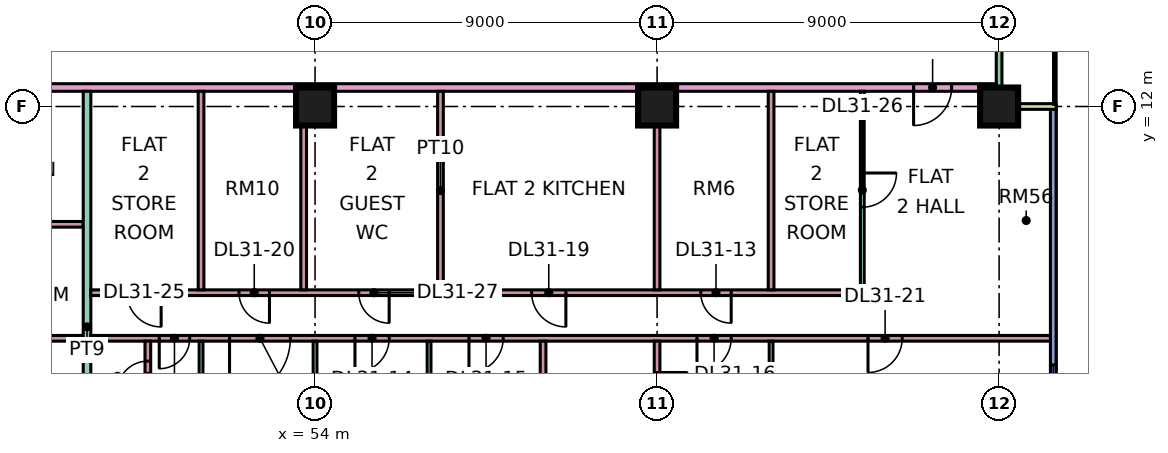
"""IFC4 building model, lengths in metres.
Left out: names, types, materials, properties, quantities, classifications, styles, units other than length and angle.
Written with IfcOpenShell. Run it as: python <this file> out.ifc"""

import sys

from ifc_helpers import new_model, si_unit, direction, frame, frame_2d, origin, origin_2d, place, context, subcontext, project, spatial, rectangle, extrude, element, fill, save


model = new_model("IFC4")
c1 = context("Model", 3, precision=1e-05, world=origin(), true_north=direction((0.0, 1.0)))
c2 = subcontext(c1, "Body", "Model", "MODEL_VIEW")
j1 = project(units=[si_unit("LENGTHUNIT", "METRE"), si_unit("PLANEANGLEUNIT", "RADIAN")], contexts=[c1])
p1 = place(None, origin())
s1 = spatial("IfcSite", under=j1, at=p1, CompositionType="ELEMENT")
p2 = place(p1, origin())
s2 = spatial("IfcBuilding", under=s1, at=p2, CompositionType="ELEMENT")
p3 = place(p2, frame((0.0, 0.0, 133.15)))
s3 = spatial("IfcBuildingStorey", under=s2, at=p3, CompositionType="ELEMENT", Elevation=133.15)
for number, where, z_axis, x_axis in (
    (1, (54.0, 12.0, 0.0), (0.0, 0.0, 1.0), (1.0, 0.0, 0.0)),
    (2, (63.0, 12.0, 0.0), (0.0, 0.0, 1.0), (1.0, 0.0, 0.0)),
    (3, (72.0, 12.0, 0.0), (0.0, 0.0, 1.0), (1.0, 0.0, 0.0)),
):
    element("IfcColumn", number, at=place(p3, frame(where, z_axis=z_axis, x_axis=x_axis)), inside=s3, PredefinedType="COLUMN", context=c2, shape_type="SweptSolid", body=[
        extrude(rectangle(XDim=1.0, YDim=1.0, at=origin_2d()), origin(), (0.0, 0.0, 1.0), 3.75),
    ])
p4 = place(p3, frame((73.425, 1.5, 0.0), z_axis=(0.0, 0.0, 1.0), x_axis=(0.0, 1.0, 0.0)))
e4 = element("IfcWall", 4, at=p4, inside=s3, PredefinedType="SOLIDWALL", context=c2, shape_type="SweptSolid", body=[
    extrude(rectangle(XDim=10.425, YDim=0.15, at=frame_2d((5.212, 0.0))), origin(), (0.0, 0.0, 1.0), 3.35),
])
p5 = place(p4, frame((0.7, 0.0, 0.45)))
e5 = element("IfcOpeningElement", 5, at=p5, cuts=e4, PredefinedType="OPENING", context=c2, shape_type="SweptSolid", body=[
    extrude(rectangle(XDim=3.0, YDim=2.4, at=frame_2d((1.5, 1.2))), frame((0.0, 0.085, 0.0), z_axis=(0.0, -1.0, 0.0), x_axis=(1.0, 0.0, 0.0)), (0.0, 0.0, 1.0), 0.17),
])
p6 = place(p3, frame((72.0, 12.075, 0.0), z_axis=(0.0, 0.0, 1.0), x_axis=(0.0, 1.0, 0.0)))
e6 = element("IfcWall", 6, at=p6, inside=s3, PredefinedType="SOLIDWALL", context=c2, shape_type="SweptSolid", body=[
    extrude(rectangle(XDim=10.35, YDim=0.15, at=frame_2d((5.175, 0.0))), origin(), (0.0, 0.0, 1.0), 3.35),
])
p7 = place(p6, frame((4.275, 0.0, 1.7)))
e7 = element("IfcOpeningElement", 7, at=p7, cuts=e6, PredefinedType="OPENING", context=c2, shape_type="SweptSolid", body=[
    extrude(rectangle(XDim=1.2, YDim=0.9, at=frame_2d((0.6, 0.45))), frame((0.0, 0.085, 0.0), z_axis=(0.0, -1.0, 0.0), x_axis=(1.0, 0.0, 0.0)), (0.0, 0.0, 1.0), 0.17),
])
p8 = place(p6, frame((7.988, 0.0, 0.45)))
e8 = element("IfcOpeningElement", 8, at=p8, cuts=e6, PredefinedType="OPENING", context=c2, shape_type="SweptSolid", body=[
    extrude(rectangle(XDim=1.8, YDim=2.4, at=frame_2d((0.9, 1.2))), frame((0.0, 0.085, 0.0), z_axis=(0.0, -1.0, 0.0), x_axis=(1.0, 0.0, 0.0)), (0.0, 0.0, 1.0), 0.17),
])
p9 = place(p3, frame((73.5, 12.0, 0.0), z_axis=(0.0, 0.0, 1.0), x_axis=(-1.0, 0.0, 0.0)))
e9 = element("IfcWall", 9, at=p9, inside=s3, PredefinedType="SOLIDWALL", context=c2, shape_type="SweptSolid", body=[
    extrude(rectangle(XDim=1.5, YDim=0.15, at=frame_2d((0.75, 0.0))), origin(), (0.0, 0.0, 1.0), 3.35),
])
p10 = place(p3, frame((40.65, 12.5, 0.0), z_axis=(0.0, 0.0, 1.0), x_axis=(1.0, 0.0, 0.0)))
e10 = element("IfcWall", 10, at=p10, inside=s3, PredefinedType="PARTITIONING", context=c2, shape_type="SweptSolid", body=[
    extrude(rectangle(XDim=31.276, YDim=0.2, at=frame_2d((15.638, 0.0))), origin(), (0.0, 0.0, 1.0), 3.35),
])
p11 = place(p10, frame((29.1, 0.0, 0.0)))
e11 = element("IfcOpeningElement", 11, at=p11, cuts=e10, PredefinedType="OPENING", context=c2, shape_type="SweptSolid", body=[
    extrude(rectangle(XDim=1.0, YDim=2.1, at=frame_2d((0.5, 1.05))), frame((0.0, 0.11, 0.0), z_axis=(0.0, -1.0, 0.0), x_axis=(1.0, 0.0, 0.0)), (0.0, 0.0, 1.0), 0.22),
])
p12 = place(p10, frame((1.05, 0.0, 0.0)))
e12 = element("IfcOpeningElement", 12, at=p12, cuts=e10, PredefinedType="OPENING", context=c2, shape_type="SweptSolid", body=[
    extrude(rectangle(XDim=1.0, YDim=2.1, at=frame_2d((0.5, 1.05))), frame((0.0, 0.11, 0.0), z_axis=(0.0, -1.0, 0.0), x_axis=(1.0, 0.0, 0.0)), (0.0, 0.0, 1.0), 0.22),
])
p13 = place(p3, frame((43.725, 5.9, 0.0), z_axis=(0.0, 0.0, 1.0), x_axis=(1.0, 0.0, 0.0)))
e13 = element("IfcWall", 13, at=p13, inside=s3, PredefinedType="PARTITIONING", context=c2, shape_type="SweptSolid", body=[
    extrude(rectangle(XDim=4.175, YDim=0.15, at=frame_2d((2.087, 0.0))), origin(), (0.0, 0.0, 1.0), 3.35),
])
p14 = place(p13, frame((1.675, 0.0, 0.0)))
e14 = element("IfcOpeningElement", 14, at=p14, cuts=e13, PredefinedType="OPENING", context=c2, shape_type="SweptSolid", body=[
    extrude(rectangle(XDim=0.8, YDim=2.1, at=frame_2d((0.4, 1.05))), frame((0.0, 0.085, 0.0), z_axis=(0.0, -1.0, 0.0), x_axis=(1.0, 0.0, 0.0)), (0.0, 0.0, 1.0), 0.17),
])
p15 = place(p3, frame((43.725, 8.9, 0.0), z_axis=(0.0, 0.0, 1.0), x_axis=(1.0, 0.0, 0.0)))
e15 = element("IfcWall", 15, at=p15, inside=s3, PredefinedType="PARTITIONING", context=c2, shape_type="SweptSolid", body=[
    extrude(rectangle(XDim=4.175, YDim=0.15, at=frame_2d((2.087, 0.0))), origin(), (0.0, 0.0, 1.0), 3.35),
])
p16 = place(p3, frame((48.0, 0.0, 0.0), z_axis=(0.0, 0.0, 1.0), x_axis=(0.0, 1.0, 0.0)))
e16 = element("IfcWall", 16, at=p16, inside=s3, PredefinedType="PARTITIONING", context=c2, shape_type="SweptSolid", body=[
    extrude(rectangle(XDim=12.4, YDim=0.2, at=frame_2d((6.2, 0.0))), origin(), (0.0, 0.0, 1.0), 3.35),
])
p17 = place(p3, frame((48.1, 5.9, 0.0), z_axis=(0.0, 0.0, 1.0), x_axis=(1.0, 0.0, 0.0)))
e17 = element("IfcWall", 17, at=p17, inside=s3, PredefinedType="PARTITIONING", context=c2, shape_type="SweptSolid", body=[
    extrude(rectangle(XDim=25.25, YDim=0.15, at=frame_2d((12.625, 0.0))), origin(), (0.0, 0.0, 1.0), 3.35),
])
p18 = place(p17, frame((6.95, 0.0, 0.0)))
e18 = element("IfcOpeningElement", 18, at=p18, cuts=e17, PredefinedType="OPENING", context=c2, shape_type="SweptSolid", body=[
    extrude(rectangle(XDim=0.9, YDim=2.1, at=frame_2d((0.45, 1.05))), frame((0.0, 0.085, 0.0), z_axis=(0.0, -1.0, 0.0), x_axis=(1.0, 0.0, 0.0)), (0.0, 0.0, 1.0), 0.17),
])
p19 = place(p17, frame((9.95, 0.0, 0.0)))
e19 = element("IfcOpeningElement", 19, at=p19, cuts=e17, PredefinedType="OPENING", context=c2, shape_type="SweptSolid", body=[
    extrude(rectangle(XDim=0.9, YDim=2.1, at=frame_2d((0.45, 1.05))), frame((0.0, 0.085, 0.0), z_axis=(0.0, -1.0, 0.0), x_axis=(1.0, 0.0, 0.0)), (0.0, 0.0, 1.0), 0.17),
])
p20 = place(p17, frame((15.95, 0.0, 0.0)))
e20 = element("IfcOpeningElement", 20, at=p20, cuts=e17, PredefinedType="OPENING", context=c2, shape_type="SweptSolid", body=[
    extrude(rectangle(XDim=0.9, YDim=2.1, at=frame_2d((0.45, 1.05))), frame((0.0, 0.085, 0.0), z_axis=(0.0, -1.0, 0.0), x_axis=(1.0, 0.0, 0.0)), (0.0, 0.0, 1.0), 0.17),
])
p21 = place(p17, frame((20.45, 0.0, 0.0)))
e21 = element("IfcOpeningElement", 21, at=p21, cuts=e17, PredefinedType="OPENING", context=c2, shape_type="SweptSolid", body=[
    extrude(rectangle(XDim=0.9, YDim=2.1, at=frame_2d((0.45, 1.05))), frame((0.0, 0.085, 0.0), z_axis=(0.0, -1.0, 0.0), x_axis=(1.0, 0.0, 0.0)), (0.0, 0.0, 1.0), 0.17),
])
p22 = place(p17, frame((1.8, 0.0, 0.0)))
e22 = element("IfcOpeningElement", 22, at=p22, cuts=e17, PredefinedType="OPENING", context=c2, shape_type="SweptSolid", body=[
    extrude(rectangle(XDim=0.8, YDim=2.1, at=frame_2d((0.4, 1.05))), frame((0.0, 0.085, 0.0), z_axis=(0.0, -1.0, 0.0), x_axis=(1.0, 0.0, 0.0)), (0.0, 0.0, 1.0), 0.17),
])
p23 = place(p17, frame((3.65, 0.0, 0.0)))
e23 = element("IfcOpeningElement", 23, at=p23, cuts=e17, PredefinedType="OPENING", context=c2, shape_type="SweptSolid", body=[
    extrude(rectangle(XDim=1.6, YDim=2.1, at=frame_2d((0.8, 1.05))), frame((0.0, 0.085, 0.0), z_axis=(0.0, -1.0, 0.0), x_axis=(1.0, 0.0, 0.0)), (0.0, 0.0, 1.0), 0.17),
])
p24 = place(p3, frame((48.1, 7.1, 0.0), z_axis=(0.0, 0.0, 1.0), x_axis=(1.0, 0.0, 0.0)))
e24 = element("IfcWall", 24, at=p24, inside=s3, PredefinedType="PARTITIONING", context=c2, shape_type="SweptSolid", body=[
    extrude(rectangle(XDim=20.35, YDim=0.15, at=frame_2d((10.175, 0.0))), origin(), (0.0, 0.0, 1.0), 3.35),
])
p25 = place(p24, frame((16.05, 0.0, 0.0)))
e25 = element("IfcOpeningElement", 25, at=p25, cuts=e24, PredefinedType="OPENING", context=c2, shape_type="SweptSolid", body=[
    extrude(rectangle(XDim=0.8, YDim=2.1, at=frame_2d((0.4, 1.05))), frame((0.0, 0.085, 0.0), z_axis=(0.0, -1.0, 0.0), x_axis=(1.0, 0.0, 0.0)), (0.0, 0.0, 1.0), 0.17),
])
p26 = place(p24, frame((11.6, 0.0, 0.0)))
e26 = element("IfcOpeningElement", 26, at=p26, cuts=e24, PredefinedType="OPENING", context=c2, shape_type="SweptSolid", body=[
    extrude(rectangle(XDim=0.9, YDim=2.1, at=frame_2d((0.45, 1.05))), frame((0.0, 0.085, 0.0), z_axis=(0.0, -1.0, 0.0), x_axis=(1.0, 0.0, 0.0)), (0.0, 0.0, 1.0), 0.17),
])
p27 = place(p24, frame((3.9, 0.0, 0.0)))
e27 = element("IfcOpeningElement", 27, at=p27, cuts=e24, PredefinedType="OPENING", context=c2, shape_type="SweptSolid", body=[
    extrude(rectangle(XDim=0.8, YDim=2.1, at=frame_2d((0.4, 1.05))), frame((0.0, 0.085, 0.0), z_axis=(0.0, -1.0, 0.0), x_axis=(1.0, 0.0, 0.0)), (0.0, 0.0, 1.0), 0.17),
])
p28 = place(p24, frame((0.95, 0.0, 0.0)))
e28 = element("IfcOpeningElement", 28, at=p28, cuts=e24, PredefinedType="OPENING", context=c2, shape_type="SweptSolid", body=[
    extrude(rectangle(XDim=0.9, YDim=2.1, at=frame_2d((0.45, 1.05))), frame((0.0, 0.085, 0.0), z_axis=(0.0, -1.0, 0.0), x_axis=(1.0, 0.0, 0.0)), (0.0, 0.0, 1.0), 0.17),
])
p29 = place(p24, frame((7.05, 0.0, 0.0)))
e29 = element("IfcOpeningElement", 29, at=p29, cuts=e24, PredefinedType="OPENING", context=c2, shape_type="SweptSolid", body=[
    extrude(rectangle(XDim=0.8, YDim=2.1, at=frame_2d((0.4, 1.05))), frame((0.0, 0.085, 0.0), z_axis=(0.0, -1.0, 0.0), x_axis=(1.0, 0.0, 0.0)), (0.0, 0.0, 1.0), 0.17),
])
p30 = place(p3, frame((49.6, 3.825, 0.0), z_axis=(0.0, 0.0, 1.0), x_axis=(0.0, 1.0, 0.0)))
e30 = element("IfcWall", 30, at=p30, inside=s3, PredefinedType="PARTITIONING", context=c2, shape_type="SweptSolid", body=[
    extrude(rectangle(XDim=2.0, YDim=0.15, at=frame_2d((1.0, 0.0))), origin(), (0.0, 0.0, 1.0), 3.35),
])
p31 = place(p30, frame((0.675, 0.0, 0.0)))
e31 = element("IfcOpeningElement", 31, at=p31, cuts=e30, PredefinedType="OPENING", context=c2, shape_type="SweptSolid", body=[
    extrude(rectangle(XDim=0.8, YDim=2.1, at=frame_2d((0.4, 1.05))), frame((0.0, 0.085, 0.0), z_axis=(0.0, -1.0, 0.0), x_axis=(1.0, 0.0, 0.0)), (0.0, 0.0, 1.0), 0.17),
])
p32 = place(p3, frame((51.0, -1.351, 0.0), z_axis=(0.0, 0.0, 1.0), x_axis=(0.0, 1.0, 0.0)))
e32 = element("IfcWall", 32, at=p32, inside=s3, PredefinedType="PARTITIONING", context=c2, shape_type="SweptSolid", body=[
    extrude(rectangle(XDim=7.176, YDim=0.1, at=frame_2d((3.588, 0.0))), origin(), (0.0, 0.0, 1.0), 3.35),
])
for number, where, z_axis, x_axis in (
    (33, (51.0, 7.175, 0.0), (0.0, 0.0, 1.0), (0.0, 1.0, 0.0)),
    (34, (53.7, 7.175, 0.0), (0.0, 0.0, 1.0), (0.0, 1.0, 0.0)),
):
    element("IfcWall", number, at=place(p3, frame(where, z_axis=z_axis, x_axis=x_axis)), inside=s3, PredefinedType="PARTITIONING", context=c2, shape_type="SweptSolid", body=[
        extrude(rectangle(XDim=5.225, YDim=0.15, at=frame_2d((2.612, 0.0))), origin(), (0.0, 0.0, 1.0), 3.35),
    ])
for number, where, z_axis, x_axis in (
    (35, (54.0, -1.351, 0.0), (0.0, 0.0, 1.0), (0.0, 1.0, 0.0)),
    (36, (57.0, -1.351, 0.0), (0.0, 0.0, 1.0), (0.0, 1.0, 0.0)),
):
    element("IfcWall", number, at=place(p3, frame(where, z_axis=z_axis, x_axis=x_axis)), inside=s3, PredefinedType="PARTITIONING", context=c2, shape_type="SweptSolid", body=[
        extrude(rectangle(XDim=7.176, YDim=0.1, at=frame_2d((3.588, 0.0))), origin(), (0.0, 0.0, 1.0), 3.35),
    ])
p33 = place(p3, frame((57.3, 7.175, 0.0), z_axis=(0.0, 0.0, 1.0), x_axis=(0.0, 1.0, 0.0)))
e37 = element("IfcWall", 37, at=p33, inside=s3, PredefinedType="PARTITIONING", context=c2, shape_type="SweptSolid", body=[
    extrude(rectangle(XDim=5.225, YDim=0.15, at=frame_2d((2.612, 0.0))), origin(), (0.0, 0.0, 1.0), 3.35),
])
p34 = place(p3, frame((60.0, 0.0, 0.0), z_axis=(0.0, 0.0, 1.0), x_axis=(0.0, 1.0, 0.0)))
e38 = element("IfcWall", 38, at=p34, inside=s3, PredefinedType="PARTITIONING", context=c2, shape_type="SweptSolid", body=[
    extrude(rectangle(XDim=5.825, YDim=0.15, at=frame_2d((2.913, 0.0))), origin(), (0.0, 0.0, 1.0), 3.35),
])
p35 = place(p3, frame((63.0, 3.375, 0.0), z_axis=(0.0, 0.0, 1.0), x_axis=(0.0, 1.0, 0.0)))
e39 = element("IfcWall", 39, at=p35, inside=s3, PredefinedType="PARTITIONING", context=c2, shape_type="SweptSolid", body=[
    extrude(rectangle(XDim=2.45, YDim=0.15, at=frame_2d((1.225, 0.0))), origin(), (0.0, 0.0, 1.0), 3.35),
])
p36 = place(p35, frame((0.825, 0.0, 0.0)))
e40 = element("IfcOpeningElement", 40, at=p36, cuts=e39, PredefinedType="OPENING", context=c2, shape_type="SweptSolid", body=[
    extrude(rectangle(XDim=0.8, YDim=2.1, at=frame_2d((0.4, 1.05))), frame((0.0, 0.085, 0.0), z_axis=(0.0, -1.0, 0.0), x_axis=(1.0, 0.0, 0.0)), (0.0, 0.0, 1.0), 0.17),
])
p37 = place(p3, frame((63.0, 7.175, 0.0), z_axis=(0.0, 0.0, 1.0), x_axis=(0.0, 1.0, 0.0)))
e41 = element("IfcWall", 41, at=p37, inside=s3, PredefinedType="PARTITIONING", context=c2, shape_type="SweptSolid", body=[
    extrude(rectangle(XDim=5.225, YDim=0.15, at=frame_2d((2.612, 0.0))), origin(), (0.0, 0.0, 1.0), 3.35),
])
p38 = place(p3, frame((66.0, 0.074, 0.0), z_axis=(0.0, 0.0, 1.0), x_axis=(0.0, 1.0, 0.0)))
e42 = element("IfcWall", 42, at=p38, inside=s3, PredefinedType="PARTITIONING", context=c2, shape_type="SweptSolid", body=[
    extrude(rectangle(XDim=5.751, YDim=0.1, at=frame_2d((2.875, 0.0))), origin(), (0.0, 0.0, 1.0), 3.35),
])
p39 = place(p3, frame((66.0, 7.175, 0.0), z_axis=(0.0, 0.0, 1.0), x_axis=(0.0, 1.0, 0.0)))
e43 = element("IfcWall", 43, at=p39, inside=s3, PredefinedType="PARTITIONING", context=c2, shape_type="SweptSolid", body=[
    extrude(rectangle(XDim=5.225, YDim=0.15, at=frame_2d((2.612, 0.0))), origin(), (0.0, 0.0, 1.0), 3.35),
])
p40 = place(p3, frame((68.4, 7.175, 0.0), z_axis=(0.0, 0.0, 1.0), x_axis=(0.0, 1.0, 0.0)))
e44 = element("IfcWall", 44, at=p40, inside=s3, PredefinedType="PARTITIONING", context=c2, shape_type="SweptSolid", body=[
    extrude(rectangle(XDim=5.225, YDim=0.1, at=frame_2d((2.612, 0.0))), origin(), (0.0, 0.0, 1.0), 3.35),
])
p41 = place(p40, frame((2.175, 0.0, 0.0)))
e45 = element("IfcOpeningElement", 45, at=p41, cuts=e44, PredefinedType="OPENING", context=c2, shape_type="SweptSolid", body=[
    extrude(rectangle(XDim=0.9, YDim=2.1, at=frame_2d((0.45, 1.05))), frame((0.0, 0.06, 0.0), z_axis=(0.0, -1.0, 0.0), x_axis=(1.0, 0.0, 0.0)), (0.0, 0.0, 1.0), 0.12),
])
p42 = place(p5, origin())
e46 = element("IfcWindow", 46, at=p42, inside=s3, PartitioningType="SINGLE_PANEL", PredefinedType="WINDOW", context=c2, shape_type="SweptSolid", body=[
    extrude(rectangle(XDim=3.0, YDim=2.4, at=frame_2d((1.5, 1.2))), frame((0.0, 0.03, 0.0), z_axis=(0.0, -1.0, 0.0), x_axis=(1.0, 0.0, 0.0)), (0.0, 0.0, 1.0), 0.06),
])
fill(e5, e46)
p43 = place(p25, origin())
e47 = element("IfcDoor", 47, at=p43, inside=s3, OperationType="SINGLE_SWING_RIGHT", PredefinedType="DOOR", context=c2, shape_type="SweptSolid", body=[
    extrude(rectangle(XDim=0.8, YDim=2.1, at=frame_2d((0.4, 1.05))), frame((0.0, 0.025, 0.0), z_axis=(0.0, -1.0, 0.0), x_axis=(1.0, 0.0, 0.0)), (0.0, 0.0, 1.0), 0.05),
])
fill(e25, e47)
p44 = place(p18, frame((0.9, 0.0, 0.0), z_axis=(0.0, 0.0, 1.0), x_axis=(-1.0, 0.0, 0.0)))
e48 = element("IfcDoor", 48, at=p44, inside=s3, OperationType="SINGLE_SWING_LEFT", PredefinedType="DOOR", context=c2, shape_type="SweptSolid", body=[
    extrude(rectangle(XDim=0.9, YDim=2.1, at=frame_2d((0.45, 1.05))), frame((0.0, 0.025, 0.0), z_axis=(0.0, -1.0, 0.0), x_axis=(1.0, 0.0, 0.0)), (0.0, 0.0, 1.0), 0.05),
])
fill(e18, e48)
p45 = place(p19, frame((0.9, 0.0, 0.0), z_axis=(0.0, 0.0, 1.0), x_axis=(-1.0, 0.0, 0.0)))
e49 = element("IfcDoor", 49, at=p45, inside=s3, OperationType="SINGLE_SWING_LEFT", PredefinedType="DOOR", context=c2, shape_type="SweptSolid", body=[
    extrude(rectangle(XDim=0.9, YDim=2.1, at=frame_2d((0.45, 1.05))), frame((0.0, 0.025, 0.0), z_axis=(0.0, -1.0, 0.0), x_axis=(1.0, 0.0, 0.0)), (0.0, 0.0, 1.0), 0.05),
])
fill(e19, e49)
p46 = place(p20, frame((0.9, 0.0, 0.0), z_axis=(0.0, 0.0, 1.0), x_axis=(-1.0, 0.0, 0.0)))
e50 = element("IfcDoor", 50, at=p46, inside=s3, OperationType="SINGLE_SWING_LEFT", PredefinedType="DOOR", context=c2, shape_type="SweptSolid", body=[
    extrude(rectangle(XDim=0.9, YDim=2.1, at=frame_2d((0.45, 1.05))), frame((0.0, 0.025, 0.0), z_axis=(0.0, -1.0, 0.0), x_axis=(1.0, 0.0, 0.0)), (0.0, 0.0, 1.0), 0.05),
])
fill(e20, e50)
p47 = place(p36, origin())
e51 = element("IfcDoor", 51, at=p47, inside=s3, OperationType="SINGLE_SWING_RIGHT", PredefinedType="DOOR", context=c2, shape_type="SweptSolid", body=[
    extrude(rectangle(XDim=0.8, YDim=2.1, at=frame_2d((0.4, 1.05))), frame((0.0, 0.025, 0.0), z_axis=(0.0, -1.0, 0.0), x_axis=(1.0, 0.0, 0.0)), (0.0, 0.0, 1.0), 0.05),
])
fill(e40, e51)
p48 = place(p11, frame((1.0, 0.0, 0.0), z_axis=(0.0, 0.0, 1.0), x_axis=(-1.0, 0.0, 0.0)))
e52 = element("IfcDoor", 52, at=p48, inside=s3, OperationType="SINGLE_SWING_LEFT", PredefinedType="DOOR", context=c2, shape_type="SweptSolid", body=[
    extrude(rectangle(XDim=1.0, YDim=2.1, at=frame_2d((0.5, 1.05))), frame((0.0, 0.025, 0.0), z_axis=(0.0, -1.0, 0.0), x_axis=(1.0, 0.0, 0.0)), (0.0, 0.0, 1.0), 0.05),
])
fill(e11, e52)
p49 = place(p26, origin())
e53 = element("IfcDoor", 53, at=p49, inside=s3, OperationType="SINGLE_SWING_RIGHT", PredefinedType="DOOR", context=c2, shape_type="SweptSolid", body=[
    extrude(rectangle(XDim=0.9, YDim=2.1, at=frame_2d((0.45, 1.05))), frame((0.0, 0.025, 0.0), z_axis=(0.0, -1.0, 0.0), x_axis=(1.0, 0.0, 0.0)), (0.0, 0.0, 1.0), 0.05),
])
fill(e26, e53)
p50 = place(p27, origin())
e54 = element("IfcDoor", 54, at=p50, inside=s3, OperationType="SINGLE_SWING_RIGHT", PredefinedType="DOOR", context=c2, shape_type="SweptSolid", body=[
    extrude(rectangle(XDim=0.8, YDim=2.1, at=frame_2d((0.4, 1.05))), frame((0.0, 0.025, 0.0), z_axis=(0.0, -1.0, 0.0), x_axis=(1.0, 0.0, 0.0)), (0.0, 0.0, 1.0), 0.05),
])
fill(e27, e54)
p51 = place(p21, frame((0.9, 0.0, 0.0), z_axis=(0.0, 0.0, 1.0), x_axis=(-1.0, 0.0, 0.0)))
e55 = element("IfcDoor", 55, at=p51, inside=s3, OperationType="SINGLE_SWING_LEFT", PredefinedType="DOOR", context=c2, shape_type="SweptSolid", body=[
    extrude(rectangle(XDim=0.9, YDim=2.1, at=frame_2d((0.45, 1.05))), frame((0.0, 0.025, 0.0), z_axis=(0.0, -1.0, 0.0), x_axis=(1.0, 0.0, 0.0)), (0.0, 0.0, 1.0), 0.05),
])
fill(e21, e55)
p52 = place(p22, frame((0.8, 0.0, 0.0), z_axis=(0.0, 0.0, 1.0), x_axis=(-1.0, 0.0, 0.0)))
e56 = element("IfcDoor", 56, at=p52, inside=s3, OperationType="SINGLE_SWING_LEFT", PredefinedType="DOOR", context=c2, shape_type="SweptSolid", body=[
    extrude(rectangle(XDim=0.8, YDim=2.1, at=frame_2d((0.4, 1.05))), frame((0.0, 0.025, 0.0), z_axis=(0.0, -1.0, 0.0), x_axis=(1.0, 0.0, 0.0)), (0.0, 0.0, 1.0), 0.05),
])
fill(e22, e56)
p53 = place(p31, origin())
e57 = element("IfcDoor", 57, at=p53, inside=s3, OperationType="SINGLE_SWING_LEFT", PredefinedType="DOOR", context=c2, shape_type="SweptSolid", body=[
    extrude(rectangle(XDim=0.8, YDim=2.1, at=frame_2d((0.4, 1.05))), frame((0.0, 0.025, 0.0), z_axis=(0.0, -1.0, 0.0), x_axis=(1.0, 0.0, 0.0)), (0.0, 0.0, 1.0), 0.05),
])
fill(e31, e57)
p54 = place(p23, frame((1.6, 0.0, 0.0), z_axis=(0.0, 0.0, 1.0), x_axis=(-1.0, 0.0, 0.0)))
e58 = element("IfcDoor", 58, at=p54, inside=s3, OperationType="DOUBLE_DOOR_SINGLE_SWING", PredefinedType="DOOR", context=c2, shape_type="SweptSolid", body=[
    extrude(rectangle(XDim=1.6, YDim=2.1, at=frame_2d((0.8, 1.05))), frame((0.0, 0.025, 0.0), z_axis=(0.0, -1.0, 0.0), x_axis=(1.0, 0.0, 0.0)), (0.0, 0.0, 1.0), 0.05),
])
fill(e23, e58)
p55 = place(p28, origin())
e59 = element("IfcDoor", 59, at=p55, inside=s3, OperationType="SINGLE_SWING_RIGHT", PredefinedType="DOOR", context=c2, shape_type="SweptSolid", body=[
    extrude(rectangle(XDim=0.9, YDim=2.1, at=frame_2d((0.45, 1.05))), frame((0.0, 0.025, 0.0), z_axis=(0.0, -1.0, 0.0), x_axis=(1.0, 0.0, 0.0)), (0.0, 0.0, 1.0), 0.05),
])
fill(e28, e59)
p56 = place(p41, origin())
e60 = element("IfcDoor", 60, at=p56, inside=s3, OperationType="SINGLE_SWING_RIGHT", PredefinedType="DOOR", context=c2, shape_type="SweptSolid", body=[
    extrude(rectangle(XDim=0.9, YDim=2.1, at=frame_2d((0.45, 1.05))), frame((0.0, 0.025, 0.0), z_axis=(0.0, -1.0, 0.0), x_axis=(1.0, 0.0, 0.0)), (0.0, 0.0, 1.0), 0.05),
])
fill(e45, e60)
p57 = place(p29, origin())
e61 = element("IfcDoor", 61, at=p57, inside=s3, OperationType="SINGLE_SWING_RIGHT", PredefinedType="DOOR", context=c2, shape_type="SweptSolid", body=[
    extrude(rectangle(XDim=0.8, YDim=2.1, at=frame_2d((0.4, 1.05))), frame((0.0, 0.025, 0.0), z_axis=(0.0, -1.0, 0.0), x_axis=(1.0, 0.0, 0.0)), (0.0, 0.0, 1.0), 0.05),
])
fill(e29, e61)
save(model, sys.argv[1])
